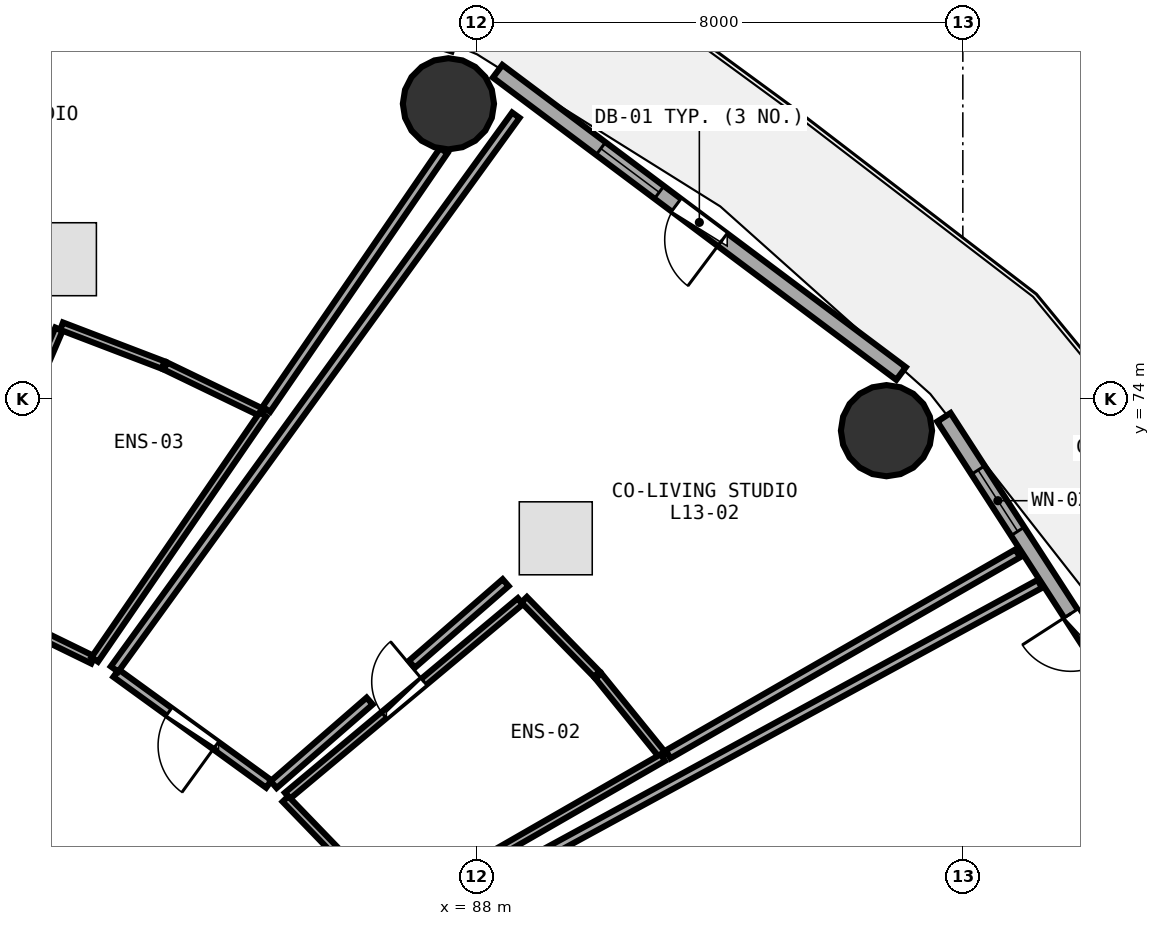
"""IFC4 building model, lengths in metres.
Left out: names, types, materials, properties, quantities, classifications, styles, units other than length and angle.
Written with IfcOpenShell. Run it as: python <this file> out.ifc"""

import sys

from ifc_helpers import new_model, si_unit, direction, frame, frame_2d, origin, origin_2d, place, context, subcontext, project, spatial, rectangle, circle, extrude, element, fill, save


model = new_model("IFC4")
c1 = context("Model", 3, precision=1e-05, world=origin(), true_north=direction((0.0, 1.0)))
c2 = subcontext(c1, "Body", "Model", "MODEL_VIEW")
j1 = project(units=[si_unit("LENGTHUNIT", "METRE"), si_unit("PLANEANGLEUNIT", "RADIAN")], contexts=[c1])
p1 = place(None, origin())
s1 = spatial("IfcSite", under=j1, at=p1, CompositionType="ELEMENT")
p2 = place(p1, origin())
s2 = spatial("IfcBuilding", under=s1, at=p2, CompositionType="ELEMENT")
p3 = place(p2, frame((0.0, 0.0, 52.5)))
s3 = spatial("IfcBuildingStorey", under=s2, at=p3, CompositionType="ELEMENT", Elevation=52.5)
for number, where, z_axis, x_axis in (
    (1, (94.744, 73.478, 0.0), (0.0, 0.0, 1.0), (1.0, 0.0, 0.0)),
    (2, (87.54, 78.854, 0.0), (0.0, 0.0, 1.0), (1.0, 0.0, 0.0)),
):
    element("IfcColumn", number, at=place(p3, frame(where, z_axis=z_axis, x_axis=x_axis)), inside=s3, PredefinedType="COLUMN", context=c2, shape_type="SweptSolid", body=[
        extrude(circle(Radius=0.75, at=origin_2d()), origin(), (0.0, 0.0, 1.0), 3.75),
    ])
p4 = place(p3, frame((99.999, 67.033, 0.0), z_axis=(0.0, 0.0, 1.0), x_axis=(-0.543005114258, 0.839729388488, 0.0)))
e3 = element("IfcWall", 3, at=p4, inside=s3, PredefinedType="SOLIDWALL", context=c2, shape_type="SweptSolid", body=[
    extrude(rectangle(XDim=7.938, YDim=0.26, at=frame_2d((3.969, 0.0))), origin(), (0.0, 0.0, 1.0), 3.475),
])
p5 = place(p4, frame((3.144, 0.0, 0.0)))
e4 = element("IfcOpeningElement", 4, at=p5, cuts=e3, PredefinedType="OPENING", context=c2, shape_type="SweptSolid", body=[
    extrude(rectangle(XDim=0.95, YDim=2.1, at=frame_2d((0.475, 1.05))), frame((0.0, 0.14, 0.0), z_axis=(0.0, -1.0, 0.0), x_axis=(1.0, 0.0, 0.0)), (0.0, 0.0, 1.0), 0.28),
])
p6 = place(p4, frame((5.704, 0.0, 0.85)))
e5 = element("IfcOpeningElement", 5, at=p6, cuts=e3, PredefinedType="OPENING", context=c2, shape_type="SweptSolid", body=[
    extrude(rectangle(XDim=1.2, YDim=1.45, at=frame_2d((0.6, 0.725))), frame((0.0, 0.14, 0.0), z_axis=(0.0, -1.0, 0.0), x_axis=(1.0, 0.0, 0.0)), (0.0, 0.0, 1.0), 0.28),
])
p7 = place(p3, frame((94.984, 74.418, 0.0), z_axis=(0.0, 0.0, 1.0), x_axis=(-0.80030733173, 0.599590005569, 0.0)))
e6 = element("IfcWall", 6, at=p7, inside=s3, PredefinedType="SOLIDWALL", context=c2, shape_type="SweptSolid", body=[
    extrude(rectangle(XDim=8.291, YDim=0.26, at=frame_2d((4.145, 0.0))), origin(), (0.0, 0.0, 1.0), 3.475),
])
p8 = place(p7, frame((3.67, 0.0, 0.0)))
e7 = element("IfcOpeningElement", 7, at=p8, cuts=e6, PredefinedType="OPENING", context=c2, shape_type="SweptSolid", body=[
    extrude(rectangle(XDim=0.95, YDim=2.1, at=frame_2d((0.475, 1.05))), frame((0.0, 0.14, 0.0), z_axis=(0.0, -1.0, 0.0), x_axis=(1.0, 0.0, 0.0)), (0.0, 0.0, 1.0), 0.28),
])
p9 = place(p7, frame((4.97, 0.0, 0.85)))
e8 = element("IfcOpeningElement", 8, at=p9, cuts=e6, PredefinedType="OPENING", context=c2, shape_type="SweptSolid", body=[
    extrude(rectangle(XDim=1.2, YDim=1.45, at=frame_2d((0.6, 0.725))), frame((0.0, 0.14, 0.0), z_axis=(0.0, -1.0, 0.0), x_axis=(1.0, 0.0, 0.0)), (0.0, 0.0, 1.0), 0.28),
])
p10 = place(p3, frame((84.892, 67.475, 0.0), z_axis=(0.0, 0.0, 1.0), x_axis=(0.767551433238, 0.64098736129, 0.0)))
e9 = element("IfcWall", 9, at=p10, inside=s3, PredefinedType="PLUMBINGWALL", context=c2, shape_type="SweptSolid", body=[
    extrude(rectangle(XDim=4.992, YDim=0.13, at=frame_2d((2.496, 0.0))), origin(), (0.0, 0.0, 1.0), 3.175),
])
p11 = place(p10, frame((2.066, 0.0, 0.0)))
e10 = element("IfcOpeningElement", 10, at=p11, cuts=e9, PredefinedType="OPENING", context=c2, shape_type="SweptSolid", body=[
    extrude(rectangle(XDim=0.86, YDim=2.05, at=frame_2d((0.43, 1.025))), frame((0.0, 0.075, 0.0), z_axis=(0.0, -1.0, 0.0), x_axis=(1.0, 0.0, 0.0)), (0.0, 0.0, 1.0), 0.15),
])
p12 = place(p3, frame((84.586, 67.667, 0.0), z_axis=(0.0, 0.0, 1.0), x_axis=(-0.80951419377, 0.587100306664, 0.0)))
e11 = element("IfcWall", 11, at=p12, inside=s3, PredefinedType="PARTITIONING", context=c2, shape_type="SweptSolid", body=[
    extrude(rectangle(XDim=3.104, YDim=0.15, at=frame_2d((1.552, 0.0))), origin(), (0.0, 0.0, 1.0), 2.875),
])
p13 = place(p12, frame((1.077, 0.0, 0.0)))
e12 = element("IfcOpeningElement", 12, at=p13, cuts=e11, PredefinedType="OPENING", context=c2, shape_type="SweptSolid", body=[
    extrude(rectangle(XDim=0.95, YDim=2.08, at=frame_2d((0.475, 1.04))), frame((0.0, 0.085, 0.0), z_axis=(0.0, -1.0, 0.0), x_axis=(1.0, 0.0, 0.0)), (0.0, 0.0, 1.0), 0.17),
])
p14 = place(p3, frame((79.281, 70.824, 0.0), z_axis=(0.0, 0.0, 1.0), x_axis=(0.394194788946, 0.919026913843, 0.0)))
e13 = element("IfcWall", 13, at=p14, inside=s3, PredefinedType="PLUMBINGWALL", context=c2, shape_type="SweptSolid", body=[
    extrude(rectangle(XDim=4.706, YDim=0.13, at=frame_2d((2.353, 0.0))), origin(), (0.0, 0.0, 1.0), 2.875),
])
p15 = place(p14, frame((1.923, 0.0, 0.0)))
e14 = element("IfcOpeningElement", 14, at=p15, cuts=e13, PredefinedType="OPENING", context=c2, shape_type="SweptSolid", body=[
    extrude(rectangle(XDim=0.86, YDim=2.05, at=frame_2d((0.43, 1.025))), frame((0.0, 0.075, 0.0), z_axis=(0.0, -1.0, 0.0), x_axis=(1.0, 0.0, 0.0)), (0.0, 0.0, 1.0), 0.15),
])
p16 = place(p3, frame((86.779, 65.245, 0.0), z_axis=(0.0, 0.0, 1.0), x_axis=(0.878114235828, 0.478451030761, 0.0)))
e15 = element("IfcWall", 15, at=p16, inside=s3, PredefinedType="PARTITIONING", context=c2, shape_type="SweptSolid", body=[
    extrude(rectangle(XDim=11.942, YDim=0.15, at=frame_2d((5.971, 0.0))), origin(), (0.0, 0.0, 1.0), 2.875),
])
p17 = place(p3, frame((85.73, 66.521, 0.0), z_axis=(0.0, 0.0, 1.0), x_axis=(-0.694622338853, 0.719374593913, 0.0)))
e16 = element("IfcWall", 16, at=p17, inside=s3, PredefinedType="PLUMBINGWALL", context=c2, shape_type="SweptSolid", body=[
    extrude(rectangle(XDim=1.253, YDim=0.13, at=frame_2d((0.626, 0.0))), origin(), (0.0, 0.0, 1.0), 2.875),
])
p18 = place(p3, frame((88.784, 70.699, 0.0), z_axis=(0.0, 0.0, 1.0), x_axis=(0.698493231478, -0.715616661055, 0.0)))
e17 = element("IfcWall", 17, at=p18, inside=s3, PredefinedType="PLUMBINGWALL", context=c2, shape_type="SweptSolid", body=[
    extrude(rectangle(XDim=1.711, YDim=0.13, at=frame_2d((0.855, 0.0))), origin(), (0.0, 0.0, 1.0), 2.875),
])
p19 = place(p3, frame((90.006, 69.445, 0.0), z_axis=(0.0, 0.0, 1.0), x_axis=(0.629707963092, -0.776831951723, 0.0)))
e18 = element("IfcWall", 18, at=p19, inside=s3, PredefinedType="PLUMBINGWALL", context=c2, shape_type="SweptSolid", body=[
    extrude(rectangle(XDim=1.694, YDim=0.13, at=frame_2d((0.847, 0.0))), origin(), (0.0, 0.0, 1.0), 3.175),
])
p20 = place(p3, frame((91.068, 68.103, 0.0), z_axis=(0.0, 0.0, 1.0), x_axis=(-0.867165143158, -0.498020696851, 0.0)))
e19 = element("IfcWall", 19, at=p20, inside=s3, PredefinedType="PLUMBINGWALL", context=c2, shape_type="SweptSolid", body=[
    extrude(rectangle(XDim=5.194, YDim=0.13, at=frame_2d((2.597, 0.0))), origin(), (0.0, 0.0, 1.0), 2.875),
])
p21 = place(p3, frame((82.049, 69.557, 0.0), z_axis=(0.0, 0.0, 1.0), x_axis=(0.586718941426, 0.809790641939, 0.0)))
e20 = element("IfcWall", 20, at=p21, inside=s3, PredefinedType="PARTITIONING", context=c2, shape_type="SweptSolid", body=[
    extrude(rectangle(XDim=11.249, YDim=0.15, at=frame_2d((5.625, 0.0))), origin(), (0.0, 0.0, 1.0), 2.875),
])
p22 = place(p3, frame((96.903, 71.461, 0.0), z_axis=(0.0, 0.0, 1.0), x_axis=(-0.866924194656, -0.498440007142, 0.0)))
e21 = element("IfcWall", 21, at=p22, inside=s3, PredefinedType="PARTITIONING", context=c2, shape_type="SweptSolid", body=[
    extrude(rectangle(XDim=6.634, YDim=0.15, at=frame_2d((3.317, 0.0))), origin(), (0.0, 0.0, 1.0), 2.875),
])
p23 = place(p3, frame((88.481, 70.979, 0.0), z_axis=(0.0, 0.0, 1.0), x_axis=(-0.754356172394, -0.656465357176, 0.0)))
e22 = element("IfcWall", 22, at=p23, inside=s3, PredefinedType="PARTITIONING", context=c2, shape_type="SweptSolid", body=[
    extrude(rectangle(XDim=2.045, YDim=0.15, at=frame_2d((1.022, 0.0))), origin(), (0.0, 0.0, 1.0), 3.175),
])
p24 = place(p3, frame((86.244, 69.032, 0.0), z_axis=(0.0, 0.0, 1.0), x_axis=(-0.754351792987, -0.656470389597, 0.0)))
e23 = element("IfcWall", 23, at=p24, inside=s3, PredefinedType="PARTITIONING", context=c2, shape_type="SweptSolid", body=[
    extrude(rectangle(XDim=2.093, YDim=0.15, at=frame_2d((1.046, 0.0))), origin(), (0.0, 0.0, 1.0), 3.235),
])
p25 = place(p3, frame((81.694, 69.708, 0.0), z_axis=(0.0, 0.0, 1.0), x_axis=(-0.898753964496, 0.43845331713, 0.0)))
e24 = element("IfcWall", 24, at=p25, inside=s3, PredefinedType="PLUMBINGWALL", context=c2, shape_type="SweptSolid", body=[
    extrude(rectangle(XDim=1.296, YDim=0.13, at=frame_2d((0.648, 0.0))), origin(), (0.0, 0.0, 1.0), 2.875),
])
p26 = place(p3, frame((81.178, 75.197, 0.0), z_axis=(0.0, 0.0, 1.0), x_axis=(0.934026387995, -0.357204012477, 0.0)))
e25 = element("IfcWall", 25, at=p26, inside=s3, PredefinedType="PLUMBINGWALL", context=c2, shape_type="SweptSolid", body=[
    extrude(rectangle(XDim=1.789, YDim=0.13, at=frame_2d((0.894, 0.0))), origin(), (0.0, 0.0, 1.0), 3.48),
])
p27 = place(p3, frame((82.885, 74.542, 0.0), z_axis=(0.0, 0.0, 1.0), x_axis=(0.900637023717, -0.434572147648, 0.0)))
e26 = element("IfcWall", 26, at=p27, inside=s3, PredefinedType="PLUMBINGWALL", context=c2, shape_type="SweptSolid", body=[
    extrude(rectangle(XDim=1.775, YDim=0.13, at=frame_2d((0.888, 0.0))), origin(), (0.0, 0.0, 1.0), 3.48),
])
p28 = place(p3, frame((84.491, 73.746, 0.0), z_axis=(0.0, 0.0, 1.0), x_axis=(-0.566068810651, -0.824357993597, 0.0)))
e27 = element("IfcWall", 27, at=p28, inside=s3, PredefinedType="PLUMBINGWALL", context=c2, shape_type="SweptSolid", body=[
    extrude(rectangle(XDim=4.889, YDim=0.13, at=frame_2d((2.444, 0.0))), origin(), (0.0, 0.0, 1.0), 3.175),
])
p29 = place(p3, frame((87.463, 78.083, 0.0), z_axis=(0.0, 0.0, 1.0), x_axis=(-0.565642433627, -0.824650615279, 0.0)))
e28 = element("IfcWall", 28, at=p29, inside=s3, PredefinedType="PARTITIONING", context=c2, shape_type="SweptSolid", body=[
    extrude(rectangle(XDim=5.157, YDim=0.15, at=frame_2d((2.579, 0.0))), origin(), (0.0, 0.0, 1.0), 2.875),
])
p30 = place(p5, frame((0.95, 0.0, 0.0), z_axis=(0.0, 0.0, 1.0), x_axis=(-1.0, 0.0, 0.0)))
e29 = element("IfcDoor", 29, at=p30, inside=s3, OperationType="SINGLE_SWING_LEFT", PredefinedType="DOOR", context=c2, shape_type="SweptSolid", body=[
    extrude(rectangle(XDim=0.95, YDim=2.1, at=frame_2d((0.475, 1.05))), frame((0.0, 0.025, 0.0), z_axis=(0.0, -1.0, 0.0), x_axis=(1.0, 0.0, 0.0)), (0.0, 0.0, 1.0), 0.05),
])
fill(e4, e29)
p31 = place(p6, origin())
e30 = element("IfcWindow", 30, at=p31, inside=s3, PartitioningType="SINGLE_PANEL", PredefinedType="WINDOW", context=c2, shape_type="SweptSolid", body=[
    extrude(rectangle(XDim=1.2, YDim=1.45, at=frame_2d((0.6, 0.725))), frame((0.0, 0.03, 0.0), z_axis=(0.0, -1.0, 0.0), x_axis=(1.0, 0.0, 0.0)), (0.0, 0.0, 1.0), 0.06),
])
fill(e5, e30)
p32 = place(p8, frame((0.95, 0.0, 0.0), z_axis=(0.0, 0.0, 1.0), x_axis=(-1.0, 0.0, 0.0)))
e31 = element("IfcDoor", 31, at=p32, inside=s3, OperationType="SINGLE_SWING_RIGHT", PredefinedType="DOOR", context=c2, shape_type="SweptSolid", body=[
    extrude(rectangle(XDim=0.95, YDim=2.1, at=frame_2d((0.475, 1.05))), frame((0.0, 0.025, 0.0), z_axis=(0.0, -1.0, 0.0), x_axis=(1.0, 0.0, 0.0)), (0.0, 0.0, 1.0), 0.05),
])
fill(e7, e31)
p33 = place(p9, origin())
e32 = element("IfcWindow", 32, at=p33, inside=s3, PartitioningType="SINGLE_PANEL", PredefinedType="WINDOW", context=c2, shape_type="SweptSolid", body=[
    extrude(rectangle(XDim=1.2, YDim=1.45, at=frame_2d((0.6, 0.725))), frame((0.0, 0.03, 0.0), z_axis=(0.0, -1.0, 0.0), x_axis=(1.0, 0.0, 0.0)), (0.0, 0.0, 1.0), 0.06),
])
fill(e8, e32)
p34 = place(p11, origin())
e33 = element("IfcDoor", 33, at=p34, inside=s3, OperationType="SINGLE_SWING_RIGHT", PredefinedType="DOOR", context=c2, shape_type="SweptSolid", body=[
    extrude(rectangle(XDim=0.86, YDim=2.05, at=frame_2d((0.43, 1.025))), frame((0.0, 0.025, 0.0), z_axis=(0.0, -1.0, 0.0), x_axis=(1.0, 0.0, 0.0)), (0.0, 0.0, 1.0), 0.05),
])
fill(e10, e33)
p35 = place(p13, origin())
e34 = element("IfcDoor", 34, at=p35, inside=s3, OperationType="SINGLE_SWING_LEFT", PredefinedType="DOOR", context=c2, shape_type="SweptSolid", body=[
    extrude(rectangle(XDim=0.95, YDim=2.08, at=frame_2d((0.475, 1.04))), frame((0.0, 0.025, 0.0), z_axis=(0.0, -1.0, 0.0), x_axis=(1.0, 0.0, 0.0)), (0.0, 0.0, 1.0), 0.05),
])
fill(e12, e34)
save(model, sys.argv[1])
